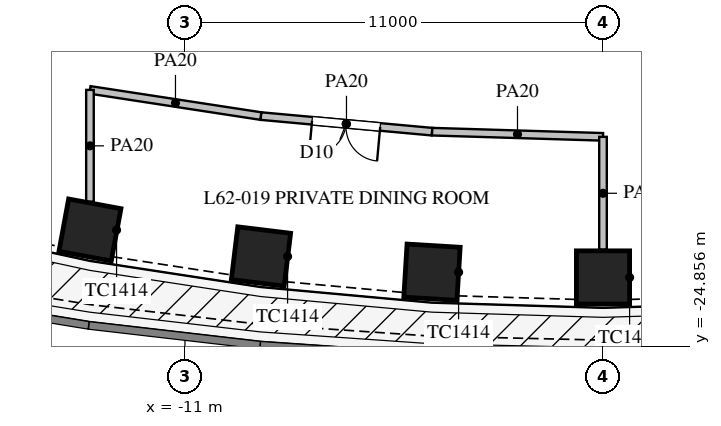
"""IFC4 building model, lengths in metres.
Left out: names, types, materials, properties, quantities, classifications, styles, units other than length and angle.
Written with IfcOpenShell. Run it as: python <this file> out.ifc"""

import sys

from ifc_helpers import new_model, si_unit, direction, frame, frame_2d, origin, origin_2d, place, context, subcontext, project, spatial, rectangle, extrude, element, fill, save


model = new_model("IFC4")
c1 = context("Model", 3, precision=1e-05, world=origin(), true_north=direction((0.0, 1.0)))
c2 = subcontext(c1, "Body", "Model", "MODEL_VIEW")
j1 = project(units=[si_unit("LENGTHUNIT", "METRE"), si_unit("PLANEANGLEUNIT", "RADIAN")], contexts=[c1])
p1 = place(None, origin())
s1 = spatial("IfcSite", under=j1, at=p1, CompositionType="ELEMENT")
p2 = place(p1, origin())
s2 = spatial("IfcBuilding", under=s1, at=p2, CompositionType="ELEMENT")
p3 = place(p2, frame((0.0, 0.0, 271.3)))
s3 = spatial("IfcBuildingStorey", under=s2, at=p3, CompositionType="ELEMENT", Elevation=271.3)
for number, where, z_axis, x_axis in (
    (1, (-13.5, -21.803, 0.0), (0.0, 0.0, 1.0), (0.983, -0.182, 0.0)),
    (2, (-9.0, -22.499, 0.0), (0.0, 0.0, 1.0), (0.993, -0.121, 0.0)),
    (3, (-4.5, -22.914, 0.0), (0.0, 0.0, 1.0), (0.998, -0.061, 0.0)),
    (4, (0.0, -23.052, 0.0), (0.0, 0.0, 1.0), (1.0, 0.0, 0.0)),
):
    element("IfcColumn", number, at=place(p3, frame(where, z_axis=z_axis, x_axis=x_axis)), inside=s3, PredefinedType="COLUMN", context=c2, shape_type="SweptSolid", body=[
        extrude(rectangle(XDim=1.4, YDim=1.4, at=origin_2d()), origin(), (0.0, 0.0, 1.0), 5.0),
    ])
p4 = place(p3, frame((-18.0, -23.358, 0.0), z_axis=(0.0, 0.0, 1.0), x_axis=(0.986986525477, -0.160802980469, 0.0)))
e5 = element("IfcWall", 5, at=p4, inside=s3, PredefinedType="PARAPET", context=c2, shape_type="SweptSolid", body=[
    extrude(rectangle(XDim=4.559, YDim=0.25, at=frame_2d((2.28, 0.0))), origin(), (0.0, 0.0, 1.0), 1.1),
])
p5 = place(p3, frame((-13.5, -24.091, 0.0), z_axis=(0.0, 0.0, 1.0), x_axis=(0.993382946625, -0.114849124309, 0.0)))
e6 = element("IfcWall", 6, at=p5, inside=s3, PredefinedType="PARAPET", context=c2, shape_type="SweptSolid", body=[
    extrude(rectangle(XDim=4.53, YDim=0.25, at=frame_2d((2.265, 0.0))), origin(), (0.0, 0.0, 1.0), 1.1),
])
p6 = place(p3, frame((-9.0, -24.611, 0.0), z_axis=(0.0, 0.0, 1.0), x_axis=(0.997623533978, -0.068900540297, 0.0)))
e7 = element("IfcWall", 7, at=p6, inside=s3, PredefinedType="PARAPET", context=c2, shape_type="SweptSolid", body=[
    extrude(rectangle(XDim=4.511, YDim=0.25, at=frame_2d((2.255, 0.0))), origin(), (0.0, 0.0, 1.0), 1.1),
])
for number, where, z_axis, x_axis in (
    (8, (-4.5, -24.922, 0.0), (0.0, 0.0, 1.0), (1.0, -0.023, 0.0)),
    (9, (0.0, -25.026, 0.0), (0.0, 0.0, 1.0), (1.0, 0.023, 0.0)),
):
    element("IfcWall", number, at=place(p3, frame(where, z_axis=z_axis, x_axis=x_axis)), inside=s3, PredefinedType="PARAPET", context=c2, shape_type="SweptSolid", body=[
        extrude(rectangle(XDim=4.501, YDim=0.25, at=frame_2d((2.25, 0.0))), origin(), (0.0, 0.0, 1.0), 1.1),
    ])
p7 = place(p3, frame((-13.5, -18.116, 0.0), z_axis=(0.0, 0.0, 1.0), x_axis=(0.988481794406, -0.151339823341, 0.0)))
e10 = element("IfcWall", 10, at=p7, inside=s3, PredefinedType="PARTITIONING", context=c2, shape_type="SweptSolid", body=[
    extrude(rectangle(XDim=4.552, YDim=0.2, at=frame_2d((2.276, 0.0))), origin(), (0.0, 0.0, 1.0), 3.6),
])
p8 = place(p3, frame((-4.5, -19.215, 0.0), z_axis=(0.0, 0.0, 1.0), x_axis=(0.999542074227, -0.030259574513, 0.0)))
e11 = element("IfcWall", 11, at=p8, inside=s3, PredefinedType="PARTITIONING", context=c2, shape_type="SweptSolid", body=[
    extrude(rectangle(XDim=4.502, YDim=0.2, at=frame_2d((2.251, 0.0))), origin(), (0.0, 0.0, 1.0), 3.6),
])
p9 = place(p3, frame((-9.0, -18.805, 0.0), z_axis=(0.0, 0.0, 1.0), x_axis=(0.995871921504, -0.090769576179, 0.0)))
e12 = element("IfcWall", 12, at=p9, inside=s3, PredefinedType="PARTITIONING", context=c2, shape_type="SweptSolid", body=[
    extrude(rectangle(XDim=4.519, YDim=0.2, at=frame_2d((2.259, 0.0))), origin(), (0.0, 0.0, 1.0), 3.6),
])
p10 = place(p9, frame((1.35, 0.0, 0.0)))
e13 = element("IfcOpeningElement", 13, at=p10, cuts=e12, PredefinedType="OPENING", context=c2, shape_type="SweptSolid", body=[
    extrude(rectangle(XDim=1.8, YDim=2.1, at=frame_2d((0.9, 1.05))), frame((0.0, 0.11, 0.0), z_axis=(0.0, -1.0, 0.0), x_axis=(1.0, 0.0, 0.0)), (0.0, 0.0, 1.0), 0.22),
])
p11 = place(p3, frame((0.0, -19.352, 0.0), z_axis=(0.0, 0.0, 1.0), x_axis=(0.0, -1.0, 0.0)))
e14 = element("IfcWall", 14, at=p11, inside=s3, PredefinedType="PARTITIONING", context=c2, shape_type="SweptSolid", body=[
    extrude(rectangle(XDim=2.97, YDim=0.2, at=frame_2d((1.485, 0.0))), origin(), (0.0, 0.0, 1.0), 3.4),
])
p12 = place(p3, frame((-13.5, -18.116, 0.0), z_axis=(0.0, 0.0, 1.0), x_axis=(0.0, -1.0, 0.0)))
e15 = element("IfcWall", 15, at=p12, inside=s3, PredefinedType="PARTITIONING", context=c2, shape_type="SweptSolid", body=[
    extrude(rectangle(XDim=2.944, YDim=0.2, at=frame_2d((1.472, 0.0))), origin(), (0.0, 0.0, 1.0), 3.2),
])
p13 = place(p10, frame((1.8, 0.0, 0.0), z_axis=(0.0, 0.0, 1.0), x_axis=(-1.0, 0.0, 0.0)))
e16 = element("IfcDoor", 16, at=p13, inside=s3, OperationType="DOUBLE_DOOR_SINGLE_SWING", PredefinedType="DOOR", context=c2, shape_type="SweptSolid", body=[
    extrude(rectangle(XDim=1.8, YDim=2.1, at=frame_2d((0.9, 1.05))), frame((0.0, 0.025, 0.0), z_axis=(0.0, -1.0, 0.0), x_axis=(1.0, 0.0, 0.0)), (0.0, 0.0, 1.0), 0.05),
])
fill(e13, e16)
save(model, sys.argv[1])
